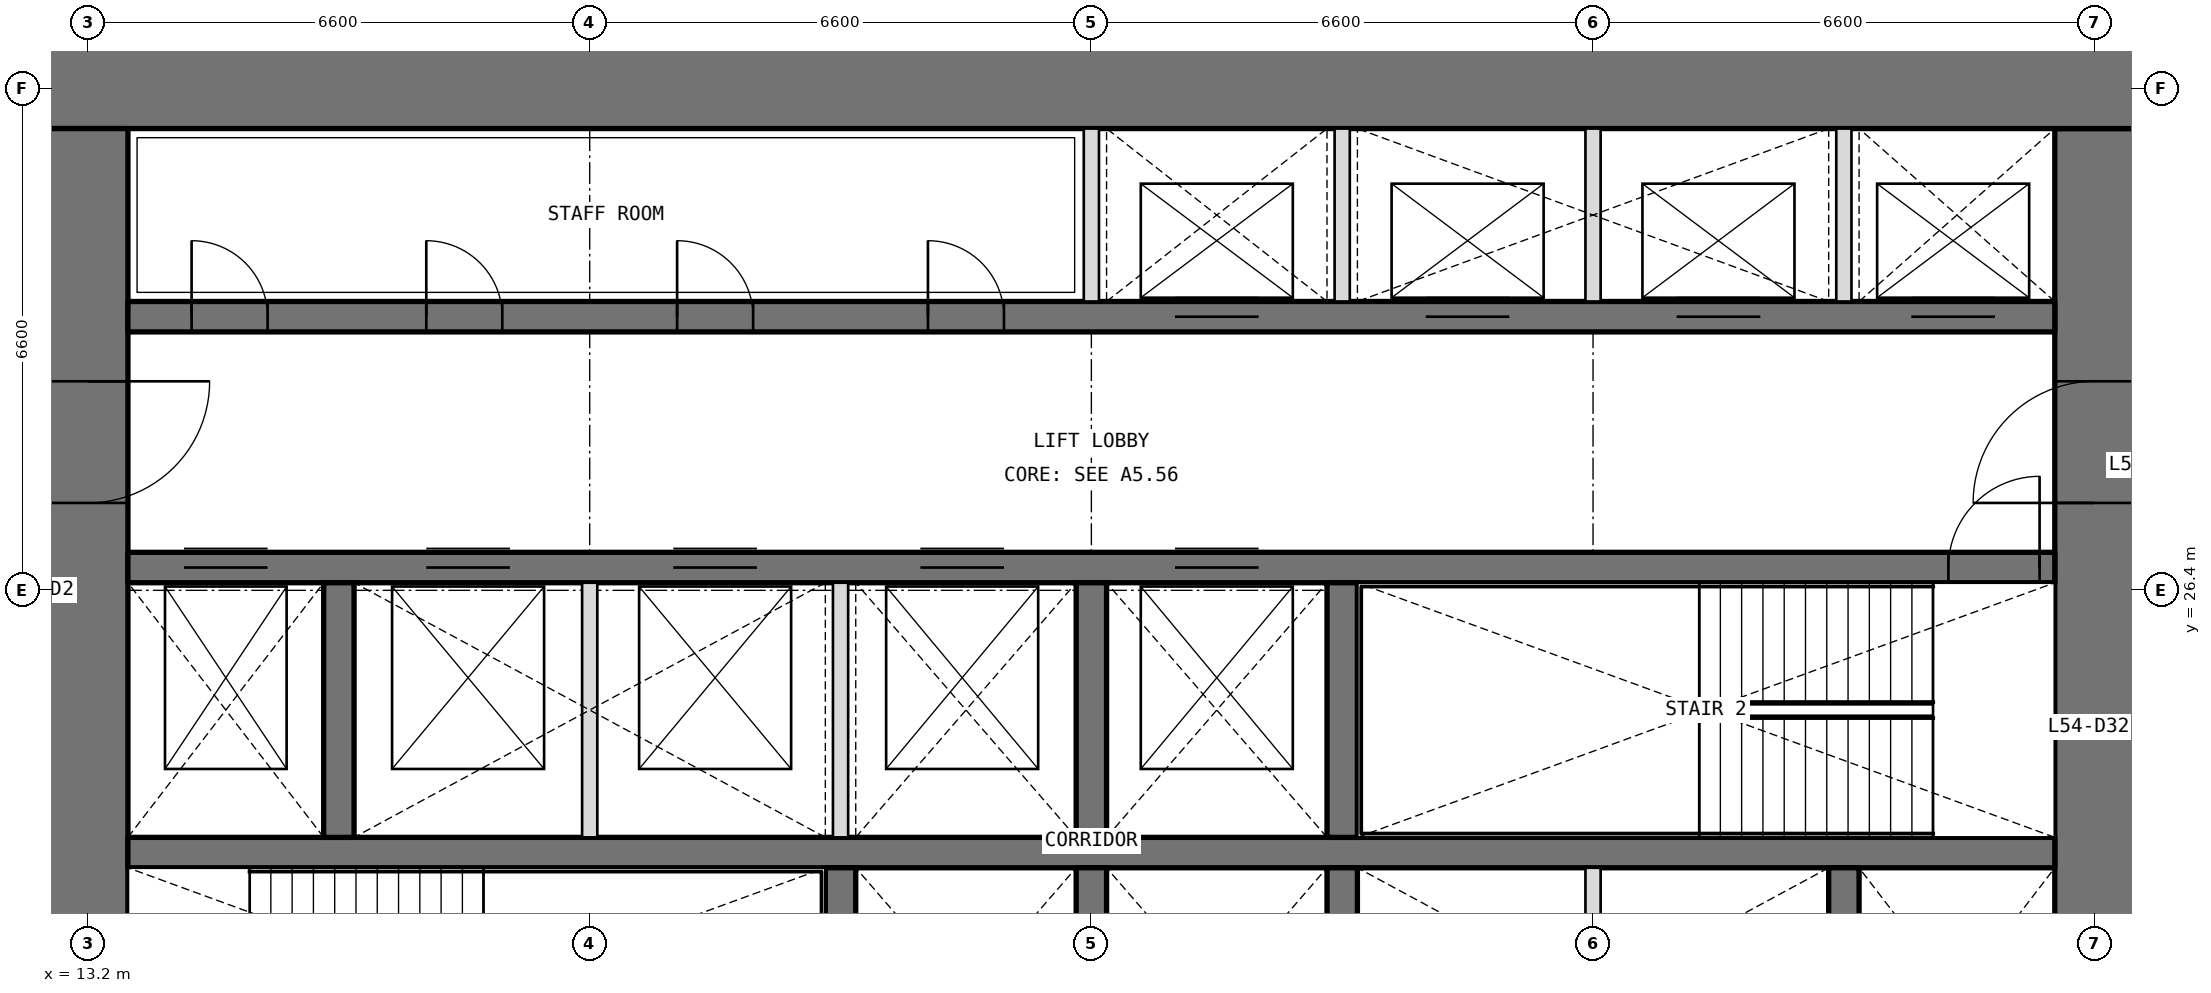
"""IFC4 building model, lengths in metres.
Left out: names, types, materials, properties, quantities, classifications, styles, units other than length and angle.
Written with IfcOpenShell. Run it as: python <this file> out.ifc"""

import sys

from ifc_helpers import new_model, si_unit, direction, frame, frame_2d, origin, place, context, subcontext, project, spatial, rectangle, extrude, element, fill, save


model = new_model("IFC4")
c1 = context("Model", 3, precision=1e-05, world=origin(), true_north=direction((0.0, 1.0)))
c2 = subcontext(c1, "Body", "Model", "MODEL_VIEW")
j1 = project(units=[si_unit("LENGTHUNIT", "METRE"), si_unit("PLANEANGLEUNIT", "RADIAN")], contexts=[c1])
p1 = place(None, origin())
s1 = spatial("IfcSite", under=j1, at=p1, CompositionType="ELEMENT")
p2 = place(p1, origin())
s2 = spatial("IfcBuilding", under=s1, at=p2, CompositionType="ELEMENT")
p3 = place(p2, frame((0.0, 0.0, 237.6)))
s3 = spatial("IfcBuildingStorey", under=s2, at=p3, CompositionType="ELEMENT", Elevation=237.6)
p4 = place(p3, frame((39.6, 13.725, 0.0), z_axis=(0.0, 0.0, 1.0), x_axis=(0.0, 1.0, 0.0)))
e1 = element("IfcWall", 1, at=p4, inside=s3, PredefinedType="SHEAR", context=c2, shape_type="SweptSolid", body=[
    extrude(rectangle(XDim=18.75, YDim=1.05, at=frame_2d((9.375, 0.0))), origin(), (0.0, 0.0, 1.0), 4.2),
])
p5 = place(p4, frame((3.025, 0.0, 0.0)))
e2 = element("IfcOpeningElement", 2, at=p5, cuts=e1, PredefinedType="OPENING", context=c2, shape_type="SweptSolid", body=[
    extrude(rectangle(XDim=1.6, YDim=2.1, at=frame_2d((0.8, 1.05))), frame((0.0, 0.535, 0.0), z_axis=(0.0, -1.0, 0.0), x_axis=(1.0, 0.0, 0.0)), (0.0, 0.0, 1.0), 1.07),
])
p6 = place(p4, frame((13.825, 0.0, 0.0)))
e3 = element("IfcOpeningElement", 3, at=p6, cuts=e1, PredefinedType="OPENING", context=c2, shape_type="SweptSolid", body=[
    extrude(rectangle(XDim=1.6, YDim=2.1, at=frame_2d((0.8, 1.05))), frame((0.0, 0.535, 0.0), z_axis=(0.0, -1.0, 0.0), x_axis=(1.0, 0.0, 0.0)), (0.0, 0.0, 1.0), 1.07),
])
p7 = place(p3, frame((40.125, 33.0, 0.0), z_axis=(0.0, 0.0, 1.0), x_axis=(-1.0, 0.0, 0.0)))
e4 = element("IfcWall", 4, at=p7, inside=s3, PredefinedType="SHEAR", context=c2, shape_type="SweptSolid", body=[
    extrude(rectangle(XDim=27.45, YDim=1.05, at=frame_2d((13.725, 0.0))), origin(), (0.0, 0.0, 1.0), 4.2),
])
p8 = place(p3, frame((13.2, 32.475, 0.0), z_axis=(0.0, 0.0, 1.0), x_axis=(0.0, -1.0, 0.0)))
e5 = element("IfcWall", 5, at=p8, inside=s3, PredefinedType="SHEAR", context=c2, shape_type="SweptSolid", body=[
    extrude(rectangle(XDim=18.75, YDim=1.05, at=frame_2d((9.375, 0.0))), origin(), (0.0, 0.0, 1.0), 4.2),
])
p9 = place(p8, frame((14.125, 0.0, 0.0)))
e6 = element("IfcOpeningElement", 6, at=p9, cuts=e5, PredefinedType="OPENING", context=c2, shape_type="SweptSolid", body=[
    extrude(rectangle(XDim=1.6, YDim=2.1, at=frame_2d((0.8, 1.05))), frame((0.0, 0.535, 0.0), z_axis=(0.0, -1.0, 0.0), x_axis=(1.0, 0.0, 0.0)), (0.0, 0.0, 1.0), 1.07),
])
p10 = place(p8, frame((3.325, 0.0, 0.0)))
e7 = element("IfcOpeningElement", 7, at=p10, cuts=e5, PredefinedType="OPENING", context=c2, shape_type="SweptSolid", body=[
    extrude(rectangle(XDim=1.6, YDim=2.1, at=frame_2d((0.8, 1.05))), frame((0.0, 0.535, 0.0), z_axis=(0.0, -1.0, 0.0), x_axis=(1.0, 0.0, 0.0)), (0.0, 0.0, 1.0), 1.07),
])
p11 = place(p3, frame((13.725, 22.95, 0.0), z_axis=(0.0, 0.0, 1.0), x_axis=(1.0, 0.0, 0.0)))
e8 = element("IfcWall", 8, at=p11, inside=s3, PredefinedType="SHEAR", context=c2, shape_type="SweptSolid", body=[
    extrude(rectangle(XDim=25.35, YDim=0.4, at=frame_2d((12.675, 0.0))), origin(), (0.0, 0.0, 1.0), 4.2),
])
p12 = place(p3, frame((13.725, 26.7, 0.0), z_axis=(0.0, 0.0, 1.0), x_axis=(1.0, 0.0, 0.0)))
e9 = element("IfcWall", 9, at=p12, inside=s3, PredefinedType="SHEAR", context=c2, shape_type="SweptSolid", body=[
    extrude(rectangle(XDim=25.35, YDim=0.4, at=frame_2d((12.675, 0.0))), origin(), (0.0, 0.0, 1.0), 4.2),
])
p13 = place(p12, frame((23.95, 0.0, 0.0)))
e10 = element("IfcOpeningElement", 10, at=p13, cuts=e9, PredefinedType="OPENING", context=c2, shape_type="SweptSolid", body=[
    extrude(rectangle(XDim=1.2, YDim=2.1, at=frame_2d((0.6, 1.05))), frame((0.0, 0.21, 0.0), z_axis=(0.0, -1.0, 0.0), x_axis=(1.0, 0.0, 0.0)), (0.0, 0.0, 1.0), 0.42),
])
p14 = place(p12, frame((0.738, 0.0, 0.0)))
e11 = element("IfcOpeningElement", 11, at=p14, cuts=e9, PredefinedType="OPENING", context=c2, shape_type="SweptSolid", body=[
    extrude(rectangle(XDim=1.1, YDim=2.1, at=frame_2d((0.55, 1.05))), frame((0.0, 0.21, 0.0), z_axis=(0.0, -1.0, 0.0), x_axis=(1.0, 0.0, 0.0)), (0.0, 0.0, 1.0), 0.42),
])
p15 = place(p12, frame((3.925, 0.0, 0.0)))
e12 = element("IfcOpeningElement", 12, at=p15, cuts=e9, PredefinedType="OPENING", context=c2, shape_type="SweptSolid", body=[
    extrude(rectangle(XDim=1.1, YDim=2.1, at=frame_2d((0.55, 1.05))), frame((0.0, 0.21, 0.0), z_axis=(0.0, -1.0, 0.0), x_axis=(1.0, 0.0, 0.0)), (0.0, 0.0, 1.0), 0.42),
])
p16 = place(p12, frame((7.175, 0.0, 0.0)))
e13 = element("IfcOpeningElement", 13, at=p16, cuts=e9, PredefinedType="OPENING", context=c2, shape_type="SweptSolid", body=[
    extrude(rectangle(XDim=1.1, YDim=2.1, at=frame_2d((0.55, 1.05))), frame((0.0, 0.21, 0.0), z_axis=(0.0, -1.0, 0.0), x_axis=(1.0, 0.0, 0.0)), (0.0, 0.0, 1.0), 0.42),
])
p17 = place(p12, frame((10.425, 0.0, 0.0)))
e14 = element("IfcOpeningElement", 14, at=p17, cuts=e9, PredefinedType="OPENING", context=c2, shape_type="SweptSolid", body=[
    extrude(rectangle(XDim=1.1, YDim=2.1, at=frame_2d((0.55, 1.05))), frame((0.0, 0.21, 0.0), z_axis=(0.0, -1.0, 0.0), x_axis=(1.0, 0.0, 0.0)), (0.0, 0.0, 1.0), 0.42),
])
p18 = place(p12, frame((13.775, 0.0, 0.0)))
e15 = element("IfcOpeningElement", 15, at=p18, cuts=e9, PredefinedType="OPENING", context=c2, shape_type="SweptSolid", body=[
    extrude(rectangle(XDim=1.1, YDim=2.1, at=frame_2d((0.55, 1.05))), frame((0.0, 0.21, 0.0), z_axis=(0.0, -1.0, 0.0), x_axis=(1.0, 0.0, 0.0)), (0.0, 0.0, 1.0), 0.42),
])
p19 = place(p3, frame((13.725, 30.0, 0.0), z_axis=(0.0, 0.0, 1.0), x_axis=(1.0, 0.0, 0.0)))
e16 = element("IfcWall", 16, at=p19, inside=s3, PredefinedType="SHEAR", context=c2, shape_type="SweptSolid", body=[
    extrude(rectangle(XDim=25.35, YDim=0.4, at=frame_2d((12.675, 0.0))), origin(), (0.0, 0.0, 1.0), 4.2),
])
p20 = place(p19, frame((0.837, 0.0, 0.0)))
e17 = element("IfcOpeningElement", 17, at=p20, cuts=e16, PredefinedType="OPENING", context=c2, shape_type="SweptSolid", body=[
    extrude(rectangle(XDim=1.0, YDim=2.1, at=frame_2d((0.5, 1.05))), frame((0.0, 0.21, 0.0), z_axis=(0.0, -1.0, 0.0), x_axis=(1.0, 0.0, 0.0)), (0.0, 0.0, 1.0), 0.42),
])
p21 = place(p19, frame((3.925, 0.0, 0.0)))
e18 = element("IfcOpeningElement", 18, at=p21, cuts=e16, PredefinedType="OPENING", context=c2, shape_type="SweptSolid", body=[
    extrude(rectangle(XDim=1.0, YDim=2.1, at=frame_2d((0.5, 1.05))), frame((0.0, 0.21, 0.0), z_axis=(0.0, -1.0, 0.0), x_axis=(1.0, 0.0, 0.0)), (0.0, 0.0, 1.0), 0.42),
])
p22 = place(p19, frame((7.225, 0.0, 0.0)))
e19 = element("IfcOpeningElement", 19, at=p22, cuts=e16, PredefinedType="OPENING", context=c2, shape_type="SweptSolid", body=[
    extrude(rectangle(XDim=1.0, YDim=2.1, at=frame_2d((0.5, 1.05))), frame((0.0, 0.21, 0.0), z_axis=(0.0, -1.0, 0.0), x_axis=(1.0, 0.0, 0.0)), (0.0, 0.0, 1.0), 0.42),
])
p23 = place(p19, frame((10.525, 0.0, 0.0)))
e20 = element("IfcOpeningElement", 20, at=p23, cuts=e16, PredefinedType="OPENING", context=c2, shape_type="SweptSolid", body=[
    extrude(rectangle(XDim=1.0, YDim=2.1, at=frame_2d((0.5, 1.05))), frame((0.0, 0.21, 0.0), z_axis=(0.0, -1.0, 0.0), x_axis=(1.0, 0.0, 0.0)), (0.0, 0.0, 1.0), 0.42),
])
p24 = place(p19, frame((13.775, 0.0, 0.0)))
e21 = element("IfcOpeningElement", 21, at=p24, cuts=e16, PredefinedType="OPENING", context=c2, shape_type="SweptSolid", body=[
    extrude(rectangle(XDim=1.1, YDim=2.1, at=frame_2d((0.55, 1.05))), frame((0.0, 0.21, 0.0), z_axis=(0.0, -1.0, 0.0), x_axis=(1.0, 0.0, 0.0)), (0.0, 0.0, 1.0), 0.42),
])
p25 = place(p19, frame((17.075, 0.0, 0.0)))
e22 = element("IfcOpeningElement", 22, at=p25, cuts=e16, PredefinedType="OPENING", context=c2, shape_type="SweptSolid", body=[
    extrude(rectangle(XDim=1.1, YDim=2.1, at=frame_2d((0.55, 1.05))), frame((0.0, 0.21, 0.0), z_axis=(0.0, -1.0, 0.0), x_axis=(1.0, 0.0, 0.0)), (0.0, 0.0, 1.0), 0.42),
])
p26 = place(p19, frame((20.375, 0.0, 0.0)))
e23 = element("IfcOpeningElement", 23, at=p26, cuts=e16, PredefinedType="OPENING", context=c2, shape_type="SweptSolid", body=[
    extrude(rectangle(XDim=1.1, YDim=2.1, at=frame_2d((0.55, 1.05))), frame((0.0, 0.21, 0.0), z_axis=(0.0, -1.0, 0.0), x_axis=(1.0, 0.0, 0.0)), (0.0, 0.0, 1.0), 0.42),
])
p27 = place(p19, frame((23.462, 0.0, 0.0)))
e24 = element("IfcOpeningElement", 24, at=p27, cuts=e16, PredefinedType="OPENING", context=c2, shape_type="SweptSolid", body=[
    extrude(rectangle(XDim=1.1, YDim=2.1, at=frame_2d((0.55, 1.05))), frame((0.0, 0.21, 0.0), z_axis=(0.0, -1.0, 0.0), x_axis=(1.0, 0.0, 0.0)), (0.0, 0.0, 1.0), 0.42),
])
for number, where, z_axis, x_axis in (
    (25, (23.1, 19.4, 0.0), (0.0, 0.0, 1.0), (0.0, 1.0, 0.0)),
    (26, (26.4, 19.4, 0.0), (0.0, 0.0, 1.0), (0.0, 1.0, 0.0)),
    (27, (29.7, 19.4, 0.0), (0.0, 0.0, 1.0), (0.0, 1.0, 0.0)),
    (28, (36.3, 19.4, 0.0), (0.0, 0.0, 1.0), (0.0, 1.0, 0.0)),
    (29, (16.5, 23.15, 0.0), (0.0, 0.0, 1.0), (0.0, 1.0, 0.0)),
    (30, (26.4, 23.15, 0.0), (0.0, 0.0, 1.0), (0.0, 1.0, 0.0)),
    (31, (29.7, 23.15, 0.0), (0.0, 0.0, 1.0), (0.0, 1.0, 0.0)),
):
    element("IfcWall", number, at=place(p3, frame(where, z_axis=z_axis, x_axis=x_axis)), inside=s3, PredefinedType="SHEAR", context=c2, shape_type="SweptSolid", body=[
        extrude(rectangle(XDim=3.35, YDim=0.4, at=frame_2d((1.675, 0.0))), origin(), (0.0, 0.0, 1.0), 4.2),
    ])
for number, where, z_axis, x_axis in (
    (32, (26.4, 30.2, 0.0), (0.0, 0.0, 1.0), (0.0, 1.0, 0.0)),
    (33, (29.7, 30.2, 0.0), (0.0, 0.0, 1.0), (0.0, 1.0, 0.0)),
    (34, (33.0, 30.2, 0.0), (0.0, 0.0, 1.0), (0.0, 1.0, 0.0)),
    (35, (36.3, 30.2, 0.0), (0.0, 0.0, 1.0), (0.0, 1.0, 0.0)),
):
    element("IfcWall", number, at=place(p3, frame(where, z_axis=z_axis, x_axis=x_axis)), inside=s3, PredefinedType="PARTITIONING", context=c2, shape_type="SweptSolid", body=[
        extrude(rectangle(XDim=2.275, YDim=0.2, at=frame_2d((1.138, 0.0))), origin(), (0.0, 0.0, 1.0), 4.2),
    ])
for number, where, z_axis, x_axis in (
    (36, (33.0, 19.4, 0.0), (0.0, 0.0, 1.0), (0.0, 1.0, 0.0)),
    (37, (19.8, 23.15, 0.0), (0.0, 0.0, 1.0), (0.0, 1.0, 0.0)),
    (38, (23.1, 23.15, 0.0), (0.0, 0.0, 1.0), (0.0, 1.0, 0.0)),
):
    element("IfcWall", number, at=place(p3, frame(where, z_axis=z_axis, x_axis=x_axis)), inside=s3, PredefinedType="PARTITIONING", context=c2, shape_type="SweptSolid", body=[
        extrude(rectangle(XDim=3.35, YDim=0.2, at=frame_2d((1.675, 0.0))), origin(), (0.0, 0.0, 1.0), 4.2),
    ])
p28 = place(p20, origin())
e39 = element("IfcDoor", 39, at=p28, inside=s3, OperationType="SINGLE_SWING_LEFT", PredefinedType="DOOR", context=c2, shape_type="SweptSolid", body=[
    extrude(rectangle(XDim=1.0, YDim=2.1, at=frame_2d((0.5, 1.05))), frame((0.0, 0.025, 0.0), z_axis=(0.0, -1.0, 0.0), x_axis=(1.0, 0.0, 0.0)), (0.0, 0.0, 1.0), 0.05),
])
fill(e17, e39)
p29 = place(p21, origin())
e40 = element("IfcDoor", 40, at=p29, inside=s3, OperationType="SINGLE_SWING_LEFT", PredefinedType="DOOR", context=c2, shape_type="SweptSolid", body=[
    extrude(rectangle(XDim=1.0, YDim=2.1, at=frame_2d((0.5, 1.05))), frame((0.0, 0.025, 0.0), z_axis=(0.0, -1.0, 0.0), x_axis=(1.0, 0.0, 0.0)), (0.0, 0.0, 1.0), 0.05),
])
fill(e18, e40)
p30 = place(p22, origin())
e41 = element("IfcDoor", 41, at=p30, inside=s3, OperationType="SINGLE_SWING_LEFT", PredefinedType="DOOR", context=c2, shape_type="SweptSolid", body=[
    extrude(rectangle(XDim=1.0, YDim=2.1, at=frame_2d((0.5, 1.05))), frame((0.0, 0.025, 0.0), z_axis=(0.0, -1.0, 0.0), x_axis=(1.0, 0.0, 0.0)), (0.0, 0.0, 1.0), 0.05),
])
fill(e19, e41)
p31 = place(p23, origin())
e42 = element("IfcDoor", 42, at=p31, inside=s3, OperationType="SINGLE_SWING_LEFT", PredefinedType="DOOR", context=c2, shape_type="SweptSolid", body=[
    extrude(rectangle(XDim=1.0, YDim=2.1, at=frame_2d((0.5, 1.05))), frame((0.0, 0.025, 0.0), z_axis=(0.0, -1.0, 0.0), x_axis=(1.0, 0.0, 0.0)), (0.0, 0.0, 1.0), 0.05),
])
fill(e20, e42)
p32 = place(p13, origin())
e43 = element("IfcDoor", 43, at=p32, inside=s3, OperationType="SINGLE_SWING_RIGHT", PredefinedType="DOOR", context=c2, shape_type="SweptSolid", body=[
    extrude(rectangle(XDim=1.2, YDim=2.1, at=frame_2d((0.6, 1.05))), frame((0.0, 0.025, 0.0), z_axis=(0.0, -1.0, 0.0), x_axis=(1.0, 0.0, 0.0)), (0.0, 0.0, 1.0), 0.05),
])
fill(e10, e43)
p33 = place(p10, origin())
e44 = element("IfcDoor", 44, at=p33, inside=s3, OperationType="DOUBLE_DOOR_DOUBLE_SWING", PredefinedType="DOOR", context=c2, shape_type="SweptSolid", body=[
    extrude(rectangle(XDim=1.6, YDim=2.1, at=frame_2d((0.8, 1.05))), frame((0.0, 0.025, 0.0), z_axis=(0.0, -1.0, 0.0), x_axis=(1.0, 0.0, 0.0)), (0.0, 0.0, 1.0), 0.05),
])
fill(e7, e44)
p34 = place(p6, origin())
e45 = element("IfcDoor", 45, at=p34, inside=s3, OperationType="DOUBLE_DOOR_DOUBLE_SWING", PredefinedType="DOOR", context=c2, shape_type="SweptSolid", body=[
    extrude(rectangle(XDim=1.6, YDim=2.1, at=frame_2d((0.8, 1.05))), frame((0.0, 0.025, 0.0), z_axis=(0.0, -1.0, 0.0), x_axis=(1.0, 0.0, 0.0)), (0.0, 0.0, 1.0), 0.05),
])
fill(e3, e45)
p35 = place(p24, origin())
e46 = element("IfcDoor", 46, at=p35, inside=s3, OperationType="DOUBLE_DOOR_SLIDING", PredefinedType="DOOR", context=c2, shape_type="SweptSolid", body=[
    extrude(rectangle(XDim=1.1, YDim=2.1, at=frame_2d((0.55, 1.05))), frame((0.0, 0.025, 0.0), z_axis=(0.0, -1.0, 0.0), x_axis=(1.0, 0.0, 0.0)), (0.0, 0.0, 1.0), 0.05),
])
fill(e21, e46)
p36 = place(p25, origin())
e47 = element("IfcDoor", 47, at=p36, inside=s3, OperationType="DOUBLE_DOOR_SLIDING", PredefinedType="DOOR", context=c2, shape_type="SweptSolid", body=[
    extrude(rectangle(XDim=1.1, YDim=2.1, at=frame_2d((0.55, 1.05))), frame((0.0, 0.025, 0.0), z_axis=(0.0, -1.0, 0.0), x_axis=(1.0, 0.0, 0.0)), (0.0, 0.0, 1.0), 0.05),
])
fill(e22, e47)
p37 = place(p26, origin())
e48 = element("IfcDoor", 48, at=p37, inside=s3, OperationType="DOUBLE_DOOR_SLIDING", PredefinedType="DOOR", context=c2, shape_type="SweptSolid", body=[
    extrude(rectangle(XDim=1.1, YDim=2.1, at=frame_2d((0.55, 1.05))), frame((0.0, 0.025, 0.0), z_axis=(0.0, -1.0, 0.0), x_axis=(1.0, 0.0, 0.0)), (0.0, 0.0, 1.0), 0.05),
])
fill(e23, e48)
p38 = place(p27, origin())
e49 = element("IfcDoor", 49, at=p38, inside=s3, OperationType="DOUBLE_DOOR_SLIDING", PredefinedType="DOOR", context=c2, shape_type="SweptSolid", body=[
    extrude(rectangle(XDim=1.1, YDim=2.1, at=frame_2d((0.55, 1.05))), frame((0.0, 0.025, 0.0), z_axis=(0.0, -1.0, 0.0), x_axis=(1.0, 0.0, 0.0)), (0.0, 0.0, 1.0), 0.05),
])
fill(e24, e49)
p39 = place(p14, origin())
e50 = element("IfcDoor", 50, at=p39, inside=s3, OperationType="DOUBLE_DOOR_SLIDING", PredefinedType="DOOR", context=c2, shape_type="SweptSolid", body=[
    extrude(rectangle(XDim=1.1, YDim=2.1, at=frame_2d((0.55, 1.05))), frame((0.0, 0.025, 0.0), z_axis=(0.0, -1.0, 0.0), x_axis=(1.0, 0.0, 0.0)), (0.0, 0.0, 1.0), 0.05),
])
fill(e11, e50)
p40 = place(p15, origin())
e51 = element("IfcDoor", 51, at=p40, inside=s3, OperationType="DOUBLE_DOOR_SLIDING", PredefinedType="DOOR", context=c2, shape_type="SweptSolid", body=[
    extrude(rectangle(XDim=1.1, YDim=2.1, at=frame_2d((0.55, 1.05))), frame((0.0, 0.025, 0.0), z_axis=(0.0, -1.0, 0.0), x_axis=(1.0, 0.0, 0.0)), (0.0, 0.0, 1.0), 0.05),
])
fill(e12, e51)
p41 = place(p16, origin())
e52 = element("IfcDoor", 52, at=p41, inside=s3, OperationType="DOUBLE_DOOR_SLIDING", PredefinedType="DOOR", context=c2, shape_type="SweptSolid", body=[
    extrude(rectangle(XDim=1.1, YDim=2.1, at=frame_2d((0.55, 1.05))), frame((0.0, 0.025, 0.0), z_axis=(0.0, -1.0, 0.0), x_axis=(1.0, 0.0, 0.0)), (0.0, 0.0, 1.0), 0.05),
])
fill(e13, e52)
p42 = place(p17, origin())
e53 = element("IfcDoor", 53, at=p42, inside=s3, OperationType="DOUBLE_DOOR_SLIDING", PredefinedType="DOOR", context=c2, shape_type="SweptSolid", body=[
    extrude(rectangle(XDim=1.1, YDim=2.1, at=frame_2d((0.55, 1.05))), frame((0.0, 0.025, 0.0), z_axis=(0.0, -1.0, 0.0), x_axis=(1.0, 0.0, 0.0)), (0.0, 0.0, 1.0), 0.05),
])
fill(e14, e53)
p43 = place(p18, origin())
e54 = element("IfcDoor", 54, at=p43, inside=s3, OperationType="DOUBLE_DOOR_SLIDING", PredefinedType="DOOR", context=c2, shape_type="SweptSolid", body=[
    extrude(rectangle(XDim=1.1, YDim=2.1, at=frame_2d((0.55, 1.05))), frame((0.0, 0.025, 0.0), z_axis=(0.0, -1.0, 0.0), x_axis=(1.0, 0.0, 0.0)), (0.0, 0.0, 1.0), 0.05),
])
fill(e15, e54)
save(model, sys.argv[1])
